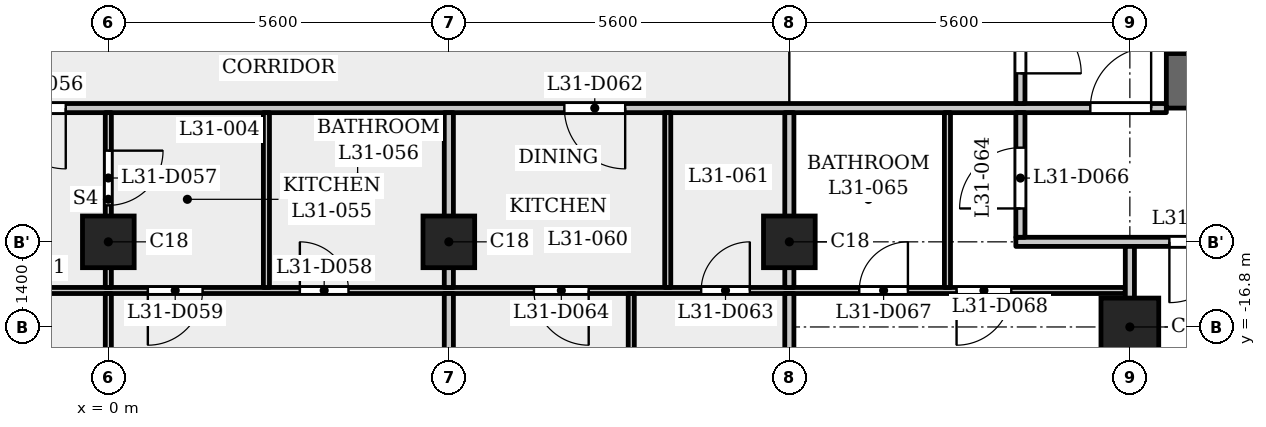
"""IFC4 building model, lengths in metres.
Left out: names, types, materials, properties, quantities, classifications, styles, units other than length and angle.
Written with IfcOpenShell. Run it as: python <this file> out.ifc"""

import sys

from ifc_helpers import new_model, si_unit, direction, frame, frame_2d, origin, origin_2d, place, context, subcontext, project, spatial, rectangle, extrude, element, fill, save


model = new_model("IFC4")
c1 = context("Model", 3, precision=1e-05, world=origin(), true_north=direction((0.0, 1.0)))
c2 = subcontext(c1, "Body", "Model", "MODEL_VIEW")
j1 = project(units=[si_unit("LENGTHUNIT", "METRE"), si_unit("PLANEANGLEUNIT", "RADIAN")], contexts=[c1])
p1 = place(None, origin())
s1 = spatial("IfcSite", under=j1, at=p1, CompositionType="ELEMENT")
p2 = place(p1, origin())
s2 = spatial("IfcBuilding", under=s1, at=p2, CompositionType="ELEMENT")
p3 = place(p2, frame((0.0, 0.0, 121.8)))
s3 = spatial("IfcBuildingStorey", under=s2, at=p3, CompositionType="ELEMENT", Elevation=121.8)
p4 = place(p3, frame((16.8, -16.8, 0.0), z_axis=(0.0, 0.0, 1.0), x_axis=(1.0, 0.0, 0.0)))
e1 = element("IfcColumn", 1, at=p4, inside=s3, PredefinedType="COLUMN", context=c2, shape_type="SweptSolid", body=[
    extrude(rectangle(XDim=0.95, YDim=0.95, at=origin_2d()), origin(), (0.0, 0.0, 1.0), 3.5),
])
for number, where, z_axis, x_axis in (
    (2, (0.0, -15.4, 0.0), (0.0, 0.0, 1.0), (1.0, 0.0, 0.0)),
    (3, (5.6, -15.4, 0.0), (0.0, 0.0, 1.0), (1.0, 0.0, 0.0)),
    (4, (11.2, -15.4, 0.0), (0.0, 0.0, 1.0), (1.0, 0.0, 0.0)),
):
    element("IfcColumn", number, at=place(p3, frame(where, z_axis=z_axis, x_axis=x_axis)), inside=s3, PredefinedType="COLUMN", context=c2, shape_type="SweptSolid", body=[
        extrude(rectangle(XDim=0.85, YDim=0.85, at=origin_2d()), origin(), (0.0, 0.0, 1.0), 3.5),
    ])
p5 = place(p3, frame((17.4, -12.75, 0.0), z_axis=(0.0, 0.0, 1.0), x_axis=(1.0, 0.0, 0.0)))
e5 = element("IfcWall", 5, at=p5, inside=s3, PredefinedType="SHEAR", context=c2, shape_type="SweptSolid", body=[
    extrude(rectangle(XDim=10.4, YDim=0.9, at=frame_2d((5.2, 0.0))), origin(), (0.0, 0.0, 1.0), 3.15),
])
p6 = place(p3, frame((17.6, -12.3, 0.0), z_axis=(0.0, 0.0, 1.0), x_axis=(0.0, 1.0, 0.0)))
e6 = element("IfcWall", 6, at=p6, inside=s3, PredefinedType="SHEAR", context=c2, shape_type="SweptSolid", body=[
    extrude(rectangle(XDim=24.6, YDim=0.4, at=frame_2d((12.3, 0.0))), origin(), (0.0, 0.0, 1.0), 3.15),
])
p7 = place(p6, frame((6.0, 0.0, 0.0)))
e7 = element("IfcOpeningElement", 7, at=p7, cuts=e6, PredefinedType="OPENING", context=c2, shape_type="SweptSolid", body=[
    extrude(rectangle(XDim=1.1, YDim=2.1, at=frame_2d((0.55, 1.05))), frame((0.0, 0.21, 0.0), z_axis=(0.0, -1.0, 0.0), x_axis=(1.0, 0.0, 0.0)), (0.0, 0.0, 1.0), 0.42),
])
p8 = place(p6, frame((8.4, 0.0, 0.0)))
e8 = element("IfcOpeningElement", 8, at=p8, cuts=e6, PredefinedType="OPENING", context=c2, shape_type="SweptSolid", body=[
    extrude(rectangle(XDim=1.1, YDim=2.1, at=frame_2d((0.55, 1.05))), frame((0.0, 0.21, 0.0), z_axis=(0.0, -1.0, 0.0), x_axis=(1.0, 0.0, 0.0)), (0.0, 0.0, 1.0), 0.42),
])
p9 = place(p6, frame((10.8, 0.0, 0.0)))
e9 = element("IfcOpeningElement", 9, at=p9, cuts=e6, PredefinedType="OPENING", context=c2, shape_type="SweptSolid", body=[
    extrude(rectangle(XDim=1.1, YDim=2.1, at=frame_2d((0.55, 1.05))), frame((0.0, 0.21, 0.0), z_axis=(0.0, -1.0, 0.0), x_axis=(1.0, 0.0, 0.0)), (0.0, 0.0, 1.0), 0.42),
])
p10 = place(p6, frame((22.8, 0.0, 0.0)))
e10 = element("IfcOpeningElement", 10, at=p10, cuts=e6, PredefinedType="OPENING", context=c2, shape_type="SweptSolid", body=[
    extrude(rectangle(XDim=1.1, YDim=2.1, at=frame_2d((0.55, 1.05))), frame((0.0, 0.21, 0.0), z_axis=(0.0, -1.0, 0.0), x_axis=(1.0, 0.0, 0.0)), (0.0, 0.0, 1.0), 0.42),
])
p11 = place(p6, frame((0.7, 0.0, 0.0)))
e11 = element("IfcOpeningElement", 11, at=p11, cuts=e6, PredefinedType="OPENING", context=c2, shape_type="SweptSolid", body=[
    extrude(rectangle(XDim=1.1, YDim=2.1, at=frame_2d((0.55, 1.05))), frame((0.0, 0.21, 0.0), z_axis=(0.0, -1.0, 0.0), x_axis=(1.0, 0.0, 0.0)), (0.0, 0.0, 1.0), 0.42),
])
p12 = place(p6, frame((12.775, 0.0, 0.0)))
e12 = element("IfcOpeningElement", 12, at=p12, cuts=e6, PredefinedType="OPENING", context=c2, shape_type="SweptSolid", body=[
    extrude(rectangle(XDim=1.8, YDim=2.1, at=frame_2d((0.9, 1.05))), frame((0.0, 0.21, 0.0), z_axis=(0.0, -1.0, 0.0), x_axis=(1.0, 0.0, 0.0)), (0.0, 0.0, 1.0), 0.42),
])
p13 = place(p3, frame((-16.725, -16.2, 0.0), z_axis=(0.0, 0.0, 1.0), x_axis=(1.0, 0.0, 0.0)))
e13 = element("IfcWall", 13, at=p13, inside=s3, PredefinedType="PARTITIONING", context=c2, shape_type="SweptSolid", body=[
    extrude(rectangle(XDim=33.45, YDim=0.1, at=frame_2d((16.725, 0.0))), origin(), (0.0, 0.0, 1.0), 3.15),
])
p14 = place(p13, frame((4.075, 0.0, 0.0)))
e14 = element("IfcOpeningElement", 14, at=p14, cuts=e13, PredefinedType="OPENING", context=c2, shape_type="SweptSolid", body=[
    extrude(rectangle(XDim=0.8, YDim=2.1, at=frame_2d((0.4, 1.05))), frame((0.0, 0.06, 0.0), z_axis=(0.0, -1.0, 0.0), x_axis=(1.0, 0.0, 0.0)), (0.0, 0.0, 1.0), 0.12),
])
p15 = place(p13, frame((9.425, 0.0, 0.0)))
e15 = element("IfcOpeningElement", 15, at=p15, cuts=e13, PredefinedType="OPENING", context=c2, shape_type="SweptSolid", body=[
    extrude(rectangle(XDim=0.9, YDim=2.1, at=frame_2d((0.45, 1.05))), frame((0.0, 0.06, 0.0), z_axis=(0.0, -1.0, 0.0), x_axis=(1.0, 0.0, 0.0)), (0.0, 0.0, 1.0), 0.12),
])
p16 = place(p13, frame((19.875, 0.0, 0.0)))
e16 = element("IfcOpeningElement", 16, at=p16, cuts=e13, PredefinedType="OPENING", context=c2, shape_type="SweptSolid", body=[
    extrude(rectangle(XDim=0.8, YDim=2.1, at=frame_2d((0.4, 1.05))), frame((0.0, 0.06, 0.0), z_axis=(0.0, -1.0, 0.0), x_axis=(1.0, 0.0, 0.0)), (0.0, 0.0, 1.0), 0.12),
])
p17 = place(p13, frame((17.375, 0.0, 0.0)))
e17 = element("IfcOpeningElement", 17, at=p17, cuts=e13, PredefinedType="OPENING", context=c2, shape_type="SweptSolid", body=[
    extrude(rectangle(XDim=0.9, YDim=2.1, at=frame_2d((0.45, 1.05))), frame((0.0, 0.06, 0.0), z_axis=(0.0, -1.0, 0.0), x_axis=(1.0, 0.0, 0.0)), (0.0, 0.0, 1.0), 0.12),
])
p18 = place(p13, frame((12.525, 0.0, 0.0)))
e18 = element("IfcOpeningElement", 18, at=p18, cuts=e13, PredefinedType="OPENING", context=c2, shape_type="SweptSolid", body=[
    extrude(rectangle(XDim=0.9, YDim=2.1, at=frame_2d((0.45, 1.05))), frame((0.0, 0.06, 0.0), z_axis=(0.0, -1.0, 0.0), x_axis=(1.0, 0.0, 0.0)), (0.0, 0.0, 1.0), 0.12),
])
p19 = place(p13, frame((14.775, 0.0, 0.0)))
e19 = element("IfcOpeningElement", 19, at=p19, cuts=e13, PredefinedType="OPENING", context=c2, shape_type="SweptSolid", body=[
    extrude(rectangle(XDim=0.9, YDim=2.1, at=frame_2d((0.45, 1.05))), frame((0.0, 0.06, 0.0), z_axis=(0.0, -1.0, 0.0), x_axis=(1.0, 0.0, 0.0)), (0.0, 0.0, 1.0), 0.12),
])
p20 = place(p13, frame((26.475, 0.0, 0.0)))
e20 = element("IfcOpeningElement", 20, at=p20, cuts=e13, PredefinedType="OPENING", context=c2, shape_type="SweptSolid", body=[
    extrude(rectangle(XDim=0.8, YDim=2.1, at=frame_2d((0.4, 1.05))), frame((0.0, 0.06, 0.0), z_axis=(0.0, -1.0, 0.0), x_axis=(1.0, 0.0, 0.0)), (0.0, 0.0, 1.0), 0.12),
])
p21 = place(p13, frame((23.725, 0.0, 0.0)))
e21 = element("IfcOpeningElement", 21, at=p21, cuts=e13, PredefinedType="OPENING", context=c2, shape_type="SweptSolid", body=[
    extrude(rectangle(XDim=0.9, YDim=2.1, at=frame_2d((0.45, 1.05))), frame((0.0, 0.06, 0.0), z_axis=(0.0, -1.0, 0.0), x_axis=(1.0, 0.0, 0.0)), (0.0, 0.0, 1.0), 0.12),
])
p22 = place(p13, frame((29.075, 0.0, 0.0)))
e22 = element("IfcOpeningElement", 22, at=p22, cuts=e13, PredefinedType="OPENING", context=c2, shape_type="SweptSolid", body=[
    extrude(rectangle(XDim=0.8, YDim=2.1, at=frame_2d((0.4, 1.05))), frame((0.0, 0.06, 0.0), z_axis=(0.0, -1.0, 0.0), x_axis=(1.0, 0.0, 0.0)), (0.0, 0.0, 1.0), 0.12),
])
p23 = place(p13, frame((30.675, 0.0, 0.0)))
e23 = element("IfcOpeningElement", 23, at=p23, cuts=e13, PredefinedType="OPENING", context=c2, shape_type="SweptSolid", body=[
    extrude(rectangle(XDim=0.9, YDim=2.1, at=frame_2d((0.45, 1.05))), frame((0.0, 0.06, 0.0), z_axis=(0.0, -1.0, 0.0), x_axis=(1.0, 0.0, 0.0)), (0.0, 0.0, 1.0), 0.12),
])
p24 = place(p3, frame((14.925, -15.4, 0.0), z_axis=(0.0, 0.0, 1.0), x_axis=(1.0, 0.0, 0.0)))
e24 = element("IfcWall", 24, at=p24, inside=s3, PredefinedType="PARTITIONING", context=c2, shape_type="SweptSolid", body=[
    extrude(rectangle(XDim=12.559, YDim=0.15, at=frame_2d((6.279, 0.0))), origin(), (0.0, 0.0, 1.0), 3.15),
])
p25 = place(p24, frame((2.525, 0.0, 0.0)))
e25 = element("IfcOpeningElement", 25, at=p25, cuts=e24, PredefinedType="OPENING", context=c2, shape_type="SweptSolid", body=[
    extrude(rectangle(XDim=1.0, YDim=2.1, at=frame_2d((0.5, 1.05))), frame((0.0, 0.085, 0.0), z_axis=(0.0, -1.0, 0.0), x_axis=(1.0, 0.0, 0.0)), (0.0, 0.0, 1.0), 0.17),
])
p26 = place(p3, frame((-17.4, -13.2, 0.0), z_axis=(0.0, 0.0, 1.0), x_axis=(1.0, 0.0, 0.0)))
e26 = element("IfcWall", 26, at=p26, inside=s3, PredefinedType="PARTITIONING", context=c2, shape_type="SweptSolid", body=[
    extrude(rectangle(XDim=34.8, YDim=0.15, at=frame_2d((17.4, 0.0))), origin(), (0.0, 0.0, 1.0), 3.15),
])
p27 = place(p26, frame((0.15, 0.0, 0.0)))
e27 = element("IfcOpeningElement", 27, at=p27, cuts=e26, PredefinedType="OPENING", context=c2, shape_type="SweptSolid", body=[
    extrude(rectangle(XDim=1.0, YDim=2.1, at=frame_2d((0.5, 1.05))), frame((0.0, 0.085, 0.0), z_axis=(0.0, -1.0, 0.0), x_axis=(1.0, 0.0, 0.0)), (0.0, 0.0, 1.0), 0.17),
])
p28 = place(p26, frame((33.55, 0.0, 0.0)))
e28 = element("IfcOpeningElement", 28, at=p28, cuts=e26, PredefinedType="OPENING", context=c2, shape_type="SweptSolid", body=[
    extrude(rectangle(XDim=1.0, YDim=2.1, at=frame_2d((0.5, 1.05))), frame((0.0, 0.085, 0.0), z_axis=(0.0, -1.0, 0.0), x_axis=(1.0, 0.0, 0.0)), (0.0, 0.0, 1.0), 0.17),
])
p29 = place(p26, frame((10.1, 0.0, 0.0)))
e29 = element("IfcOpeningElement", 29, at=p29, cuts=e26, PredefinedType="OPENING", context=c2, shape_type="SweptSolid", body=[
    extrude(rectangle(XDim=1.0, YDim=2.1, at=frame_2d((0.5, 1.05))), frame((0.0, 0.085, 0.0), z_axis=(0.0, -1.0, 0.0), x_axis=(1.0, 0.0, 0.0)), (0.0, 0.0, 1.0), 0.17),
])
p30 = place(p26, frame((15.7, 0.0, 0.0)))
e30 = element("IfcOpeningElement", 30, at=p30, cuts=e26, PredefinedType="OPENING", context=c2, shape_type="SweptSolid", body=[
    extrude(rectangle(XDim=1.0, YDim=2.1, at=frame_2d((0.5, 1.05))), frame((0.0, 0.085, 0.0), z_axis=(0.0, -1.0, 0.0), x_axis=(1.0, 0.0, 0.0)), (0.0, 0.0, 1.0), 0.17),
])
p31 = place(p26, frame((24.9, 0.0, 0.0)))
e31 = element("IfcOpeningElement", 31, at=p31, cuts=e26, PredefinedType="OPENING", context=c2, shape_type="SweptSolid", body=[
    extrude(rectangle(XDim=1.0, YDim=2.1, at=frame_2d((0.5, 1.05))), frame((0.0, 0.085, 0.0), z_axis=(0.0, -1.0, 0.0), x_axis=(1.0, 0.0, 0.0)), (0.0, 0.0, 1.0), 0.17),
])
p32 = place(p3, frame((0.0, -22.98, 0.0), z_axis=(0.0, 0.0, 1.0), x_axis=(0.0, 1.0, 0.0)))
e32 = element("IfcWall", 32, at=p32, inside=s3, PredefinedType="PARTITIONING", context=c2, shape_type="SweptSolid", body=[
    extrude(rectangle(XDim=6.73, YDim=0.1, at=frame_2d((3.365, 0.0))), origin(), (0.0, 0.0, 1.0), 3.15),
])
p33 = place(p3, frame((0.0, -16.15, 0.0), z_axis=(0.0, 0.0, 1.0), x_axis=(0.0, 1.0, 0.0)))
e33 = element("IfcWall", 33, at=p33, inside=s3, PredefinedType="PARTITIONING", context=c2, shape_type="SweptSolid", body=[
    extrude(rectangle(XDim=2.875, YDim=0.1, at=frame_2d((1.438, 0.0))), origin(), (0.0, 0.0, 1.0), 3.15),
])
p34 = place(p33, frame((1.35, 0.0, 0.0)))
e34 = element("IfcOpeningElement", 34, at=p34, cuts=e33, PredefinedType="OPENING", context=c2, shape_type="SweptSolid", body=[
    extrude(rectangle(XDim=0.9, YDim=2.1, at=frame_2d((0.45, 1.05))), frame((0.0, 0.06, 0.0), z_axis=(0.0, -1.0, 0.0), x_axis=(1.0, 0.0, 0.0)), (0.0, 0.0, 1.0), 0.12),
])
p35 = place(p3, frame((2.6, -16.15, 0.0), z_axis=(0.0, 0.0, 1.0), x_axis=(0.0, 1.0, 0.0)))
e35 = element("IfcWall", 35, at=p35, inside=s3, PredefinedType="PARTITIONING", context=c2, shape_type="SweptSolid", body=[
    extrude(rectangle(XDim=2.875, YDim=0.1, at=frame_2d((1.438, 0.0))), origin(), (0.0, 0.0, 1.0), 3.15),
])
p36 = place(p3, frame((5.6, -22.98, 0.0), z_axis=(0.0, 0.0, 1.0), x_axis=(0.0, 1.0, 0.0)))
e36 = element("IfcWall", 36, at=p36, inside=s3, PredefinedType="PARTITIONING", context=c2, shape_type="SweptSolid", body=[
    extrude(rectangle(XDim=6.73, YDim=0.15, at=frame_2d((3.365, 0.0))), origin(), (0.0, 0.0, 1.0), 3.15),
])
p37 = place(p3, frame((5.6, -16.15, 0.0), z_axis=(0.0, 0.0, 1.0), x_axis=(0.0, 1.0, 0.0)))
e37 = element("IfcWall", 37, at=p37, inside=s3, PredefinedType="PARTITIONING", context=c2, shape_type="SweptSolid", body=[
    extrude(rectangle(XDim=2.875, YDim=0.15, at=frame_2d((1.438, 0.0))), origin(), (0.0, 0.0, 1.0), 3.15),
])
p38 = place(p3, frame((8.6, -22.08, 0.0), z_axis=(0.0, 0.0, 1.0), x_axis=(0.0, 1.0, 0.0)))
e38 = element("IfcWall", 38, at=p38, inside=s3, PredefinedType="PARTITIONING", context=c2, shape_type="SweptSolid", body=[
    extrude(rectangle(XDim=5.83, YDim=0.1, at=frame_2d((2.915, 0.0))), origin(), (0.0, 0.0, 1.0), 3.15),
])
p39 = place(p38, frame((0.42, 0.0, 0.0)))
e39 = element("IfcOpeningElement", 39, at=p39, cuts=e38, PredefinedType="OPENING", context=c2, shape_type="SweptSolid", body=[
    extrude(rectangle(XDim=0.9, YDim=2.1, at=frame_2d((0.45, 1.05))), frame((0.0, 0.06, 0.0), z_axis=(0.0, -1.0, 0.0), x_axis=(1.0, 0.0, 0.0)), (0.0, 0.0, 1.0), 0.12),
])
p40 = place(p3, frame((9.2, -16.15, 0.0), z_axis=(0.0, 0.0, 1.0), x_axis=(0.0, 1.0, 0.0)))
e40 = element("IfcWall", 40, at=p40, inside=s3, PredefinedType="PARTITIONING", context=c2, shape_type="SweptSolid", body=[
    extrude(rectangle(XDim=2.875, YDim=0.1, at=frame_2d((1.438, 0.0))), origin(), (0.0, 0.0, 1.0), 3.15),
])
p41 = place(p3, frame((11.2, -22.98, 0.0), z_axis=(0.0, 0.0, 1.0), x_axis=(0.0, 1.0, 0.0)))
e41 = element("IfcWall", 41, at=p41, inside=s3, PredefinedType="PARTITIONING", context=c2, shape_type="SweptSolid", body=[
    extrude(rectangle(XDim=6.73, YDim=0.15, at=frame_2d((3.365, 0.0))), origin(), (0.0, 0.0, 1.0), 3.15),
])
p42 = place(p3, frame((11.2, -16.15, 0.0), z_axis=(0.0, 0.0, 1.0), x_axis=(0.0, 1.0, 0.0)))
e42 = element("IfcWall", 42, at=p42, inside=s3, PredefinedType="PARTITIONING", context=c2, shape_type="SweptSolid", body=[
    extrude(rectangle(XDim=2.875, YDim=0.15, at=frame_2d((1.438, 0.0))), origin(), (0.0, 0.0, 1.0), 3.15),
])
p43 = place(p3, frame((13.8, -16.15, 0.0), z_axis=(0.0, 0.0, 1.0), x_axis=(0.0, 1.0, 0.0)))
e43 = element("IfcWall", 43, at=p43, inside=s3, PredefinedType="PARTITIONING", context=c2, shape_type="SweptSolid", body=[
    extrude(rectangle(XDim=2.875, YDim=0.1, at=frame_2d((1.438, 0.0))), origin(), (0.0, 0.0, 1.0), 3.15),
])
p44 = place(p3, frame((15.0, -15.325, 0.0), z_axis=(0.0, 0.0, 1.0), x_axis=(0.0, 1.0, 0.0)))
e44 = element("IfcWall", 44, at=p44, inside=s3, PredefinedType="PARTITIONING", context=c2, shape_type="SweptSolid", body=[
    extrude(rectangle(XDim=2.05, YDim=0.15, at=frame_2d((1.025, 0.0))), origin(), (0.0, 0.0, 1.0), 3.15),
])
p45 = place(p44, frame((0.474, 0.0, 0.0)))
e45 = element("IfcOpeningElement", 45, at=p45, cuts=e44, PredefinedType="OPENING", context=c2, shape_type="SweptSolid", body=[
    extrude(rectangle(XDim=1.0, YDim=2.1, at=frame_2d((0.5, 1.05))), frame((0.0, 0.085, 0.0), z_axis=(0.0, -1.0, 0.0), x_axis=(1.0, 0.0, 0.0)), (0.0, 0.0, 1.0), 0.17),
])
p46 = place(p3, frame((15.0, -13.125, 0.0), z_axis=(0.0, 0.0, 1.0), x_axis=(0.0, 1.0, 0.0)))
e46 = element("IfcWall", 46, at=p46, inside=s3, PredefinedType="PARTITIONING", context=c2, shape_type="SweptSolid", body=[
    extrude(rectangle(XDim=6.356, YDim=0.15, at=frame_2d((3.178, 0.0))), origin(), (0.0, 0.0, 1.0), 3.15),
])
p47 = place(p46, frame((0.496, 0.0, 0.0)))
e47 = element("IfcOpeningElement", 47, at=p47, cuts=e46, PredefinedType="OPENING", context=c2, shape_type="SweptSolid", body=[
    extrude(rectangle(XDim=1.0, YDim=2.1, at=frame_2d((0.5, 1.05))), frame((0.0, 0.085, 0.0), z_axis=(0.0, -1.0, 0.0), x_axis=(1.0, 0.0, 0.0)), (0.0, 0.0, 1.0), 0.17),
])
p48 = place(p3, frame((16.8, -22.98, 0.0), z_axis=(0.0, 0.0, 1.0), x_axis=(0.0, 1.0, 0.0)))
e48 = element("IfcWall", 48, at=p48, inside=s3, PredefinedType="PARTITIONING", context=c2, shape_type="SweptSolid", body=[
    extrude(rectangle(XDim=7.505, YDim=0.15, at=frame_2d((3.752, 0.0))), origin(), (0.0, 0.0, 1.0), 3.15),
])
p49 = place(p47, origin())
e49 = element("IfcDoor", 49, at=p49, inside=s3, OperationType="SINGLE_SWING_LEFT", PredefinedType="DOOR", context=c2, shape_type="SweptSolid", body=[
    extrude(rectangle(XDim=1.0, YDim=2.1, at=frame_2d((0.5, 1.05))), frame((0.0, 0.025, 0.0), z_axis=(0.0, -1.0, 0.0), x_axis=(1.0, 0.0, 0.0)), (0.0, 0.0, 1.0), 0.05),
])
fill(e47, e49)
p50 = place(p28, origin())
e50 = element("IfcDoor", 50, at=p50, inside=s3, OperationType="SINGLE_SWING_LEFT", PredefinedType="DOOR", context=c2, shape_type="SweptSolid", body=[
    extrude(rectangle(XDim=1.0, YDim=2.1, at=frame_2d((0.5, 1.05))), frame((0.0, 0.025, 0.0), z_axis=(0.0, -1.0, 0.0), x_axis=(1.0, 0.0, 0.0)), (0.0, 0.0, 1.0), 0.05),
])
fill(e28, e50)
p51 = place(p30, origin())
e51 = element("IfcDoor", 51, at=p51, inside=s3, OperationType="SINGLE_SWING_RIGHT", PredefinedType="DOOR", context=c2, shape_type="SweptSolid", body=[
    extrude(rectangle(XDim=1.0, YDim=2.1, at=frame_2d((0.5, 1.05))), frame((0.0, 0.025, 0.0), z_axis=(0.0, -1.0, 0.0), x_axis=(1.0, 0.0, 0.0)), (0.0, 0.0, 1.0), 0.05),
])
fill(e30, e51)
p52 = place(p34, origin())
e52 = element("IfcDoor", 52, at=p52, inside=s3, OperationType="SINGLE_SWING_RIGHT", PredefinedType="DOOR", context=c2, shape_type="SweptSolid", body=[
    extrude(rectangle(XDim=0.9, YDim=2.1, at=frame_2d((0.45, 1.05))), frame((0.0, 0.025, 0.0), z_axis=(0.0, -1.0, 0.0), x_axis=(1.0, 0.0, 0.0)), (0.0, 0.0, 1.0), 0.05),
])
fill(e34, e52)
p53 = place(p16, origin())
e53 = element("IfcDoor", 53, at=p53, inside=s3, OperationType="SINGLE_SWING_RIGHT", PredefinedType="DOOR", context=c2, shape_type="SweptSolid", body=[
    extrude(rectangle(XDim=0.8, YDim=2.1, at=frame_2d((0.4, 1.05))), frame((0.0, 0.025, 0.0), z_axis=(0.0, -1.0, 0.0), x_axis=(1.0, 0.0, 0.0)), (0.0, 0.0, 1.0), 0.05),
])
fill(e16, e53)
p54 = place(p17, origin())
e54 = element("IfcDoor", 54, at=p54, inside=s3, OperationType="SINGLE_SWING_LEFT", PredefinedType="DOOR", context=c2, shape_type="SweptSolid", body=[
    extrude(rectangle(XDim=0.9, YDim=2.1, at=frame_2d((0.45, 1.05))), frame((0.0, 0.025, 0.0), z_axis=(0.0, -1.0, 0.0), x_axis=(1.0, 0.0, 0.0)), (0.0, 0.0, 1.0), 0.05),
])
fill(e17, e54)
p55 = place(p31, origin())
e55 = element("IfcDoor", 55, at=p55, inside=s3, OperationType="SINGLE_SWING_RIGHT", PredefinedType="DOOR", context=c2, shape_type="SweptSolid", body=[
    extrude(rectangle(XDim=1.0, YDim=2.1, at=frame_2d((0.5, 1.05))), frame((0.0, 0.025, 0.0), z_axis=(0.0, -1.0, 0.0), x_axis=(1.0, 0.0, 0.0)), (0.0, 0.0, 1.0), 0.05),
])
fill(e31, e55)
p56 = place(p20, origin())
e56 = element("IfcDoor", 56, at=p56, inside=s3, OperationType="SINGLE_SWING_LEFT", PredefinedType="DOOR", context=c2, shape_type="SweptSolid", body=[
    extrude(rectangle(XDim=0.8, YDim=2.1, at=frame_2d((0.4, 1.05))), frame((0.0, 0.025, 0.0), z_axis=(0.0, -1.0, 0.0), x_axis=(1.0, 0.0, 0.0)), (0.0, 0.0, 1.0), 0.05),
])
fill(e20, e56)
p57 = place(p21, origin())
e57 = element("IfcDoor", 57, at=p57, inside=s3, OperationType="SINGLE_SWING_RIGHT", PredefinedType="DOOR", context=c2, shape_type="SweptSolid", body=[
    extrude(rectangle(XDim=0.9, YDim=2.1, at=frame_2d((0.45, 1.05))), frame((0.0, 0.025, 0.0), z_axis=(0.0, -1.0, 0.0), x_axis=(1.0, 0.0, 0.0)), (0.0, 0.0, 1.0), 0.05),
])
fill(e21, e57)
p58 = place(p45, origin())
e58 = element("IfcDoor", 58, at=p58, inside=s3, OperationType="SINGLE_SWING_RIGHT", PredefinedType="DOOR", context=c2, shape_type="SweptSolid", body=[
    extrude(rectangle(XDim=1.0, YDim=2.1, at=frame_2d((0.5, 1.05))), frame((0.0, 0.025, 0.0), z_axis=(0.0, -1.0, 0.0), x_axis=(1.0, 0.0, 0.0)), (0.0, 0.0, 1.0), 0.05),
])
fill(e45, e58)
p59 = place(p22, origin())
e59 = element("IfcDoor", 59, at=p59, inside=s3, OperationType="SINGLE_SWING_LEFT", PredefinedType="DOOR", context=c2, shape_type="SweptSolid", body=[
    extrude(rectangle(XDim=0.8, YDim=2.1, at=frame_2d((0.4, 1.05))), frame((0.0, 0.025, 0.0), z_axis=(0.0, -1.0, 0.0), x_axis=(1.0, 0.0, 0.0)), (0.0, 0.0, 1.0), 0.05),
])
fill(e22, e59)
p60 = place(p23, origin())
e60 = element("IfcDoor", 60, at=p60, inside=s3, OperationType="SINGLE_SWING_LEFT", PredefinedType="DOOR", context=c2, shape_type="SweptSolid", body=[
    extrude(rectangle(XDim=0.9, YDim=2.1, at=frame_2d((0.45, 1.05))), frame((0.0, 0.025, 0.0), z_axis=(0.0, -1.0, 0.0), x_axis=(1.0, 0.0, 0.0)), (0.0, 0.0, 1.0), 0.05),
])
fill(e23, e60)
p61 = place(p25, origin())
e61 = element("IfcDoor", 61, at=p61, inside=s3, OperationType="SINGLE_SWING_LEFT", PredefinedType="DOOR", context=c2, shape_type="SweptSolid", body=[
    extrude(rectangle(XDim=1.0, YDim=2.1, at=frame_2d((0.5, 1.05))), frame((0.0, 0.025, 0.0), z_axis=(0.0, -1.0, 0.0), x_axis=(1.0, 0.0, 0.0)), (0.0, 0.0, 1.0), 0.05),
])
fill(e25, e61)
save(model, sys.argv[1])
